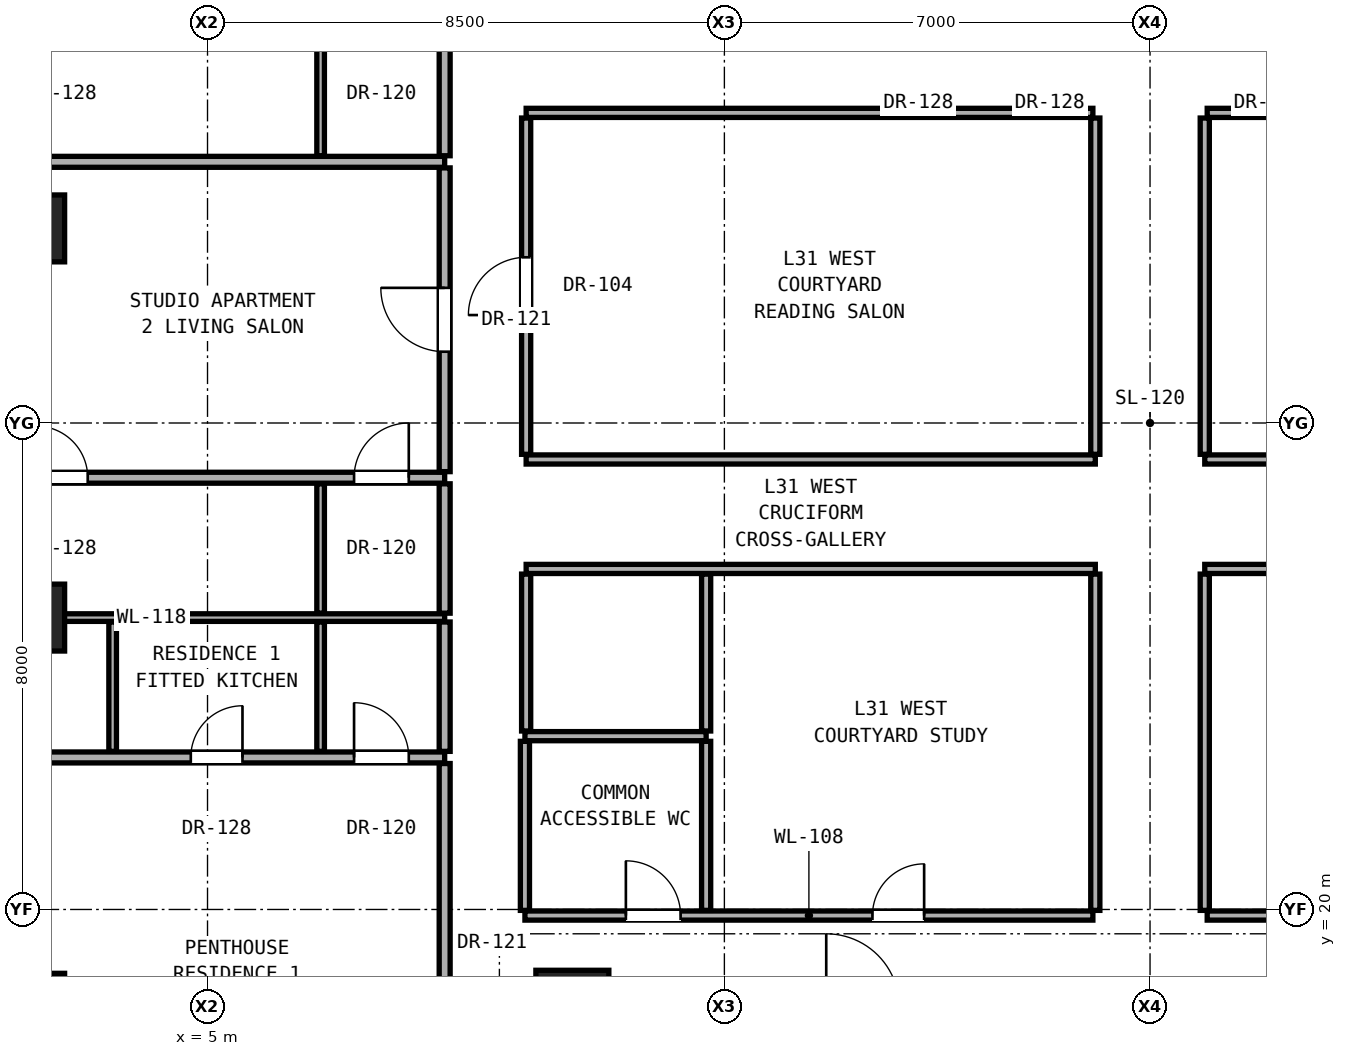
"""IFC4 building model, lengths in metres.
Left out: names, types, materials, properties, quantities, classifications, styles, units other than length and angle.
Written with IfcOpenShell. Run it as: python <this file> out.ifc"""

import sys

from ifc_helpers import new_model, si_unit, direction, frame, frame_2d, origin, origin_2d, place, context, subcontext, project, spatial, rectangle, hollow_rectangle, extrude, element, fill, save


model = new_model("IFC4")
c1 = context("Model", 3, precision=1e-05, world=origin(), true_north=direction((0.0, 1.0)))
c2 = subcontext(c1, "Body", "Model", "MODEL_VIEW")
j1 = project(units=[si_unit("LENGTHUNIT", "METRE"), si_unit("PLANEANGLEUNIT", "RADIAN")], contexts=[c1])
p1 = place(None, origin())
s1 = spatial("IfcSite", under=j1, at=p1, CompositionType="ELEMENT")
p2 = place(p1, origin())
s2 = spatial("IfcBuilding", under=s1, at=p2, CompositionType="ELEMENT")
p3 = place(p2, frame((0.0, 0.0, 111.5)))
s3 = spatial("IfcBuildingStorey", under=s2, at=p3, CompositionType="ELEMENT", Elevation=111.5)
p4 = place(p3, frame((11.0, 18.4, 0.0), z_axis=(0.0, 0.0, 1.0), x_axis=(1.0, 0.0, 0.0)))
e1 = element("IfcColumn", 1, at=p4, inside=s3, PredefinedType="COLUMN", context=c2, shape_type="SweptSolid", body=[
    extrude(rectangle(XDim=1.2, YDim=1.2, at=origin_2d()), origin(), (0.0, 0.0, 1.0), 3.3),
])
for number, where, z_axis, x_axis in (
    (2, (2.1, 18.4, 0.0), (0.0, 0.0, 1.0), (1.0, 0.0, 0.0)),
    (3, (2.1, 24.8, 0.0), (0.0, 0.0, 1.0), (1.0, 0.0, 0.0)),
    (4, (2.1, 31.2, 0.0), (0.0, 0.0, 1.0), (1.0, 0.0, 0.0)),
):
    element("IfcColumn", number, at=place(p3, frame(where, z_axis=z_axis, x_axis=x_axis)), inside=s3, PredefinedType="COLUMN", context=c2, shape_type="SweptSolid", body=[
        extrude(hollow_rectangle(XDim=1.1, YDim=1.1, WallThickness=0.06, at=origin_2d()), origin(), (0.0, 0.0, 1.0), 3.3),
    ])
p5 = place(p3, frame((10.22, 19.9, 0.0), z_axis=(0.0, 0.0, 1.0), x_axis=(1.0, 0.0, 0.0)))
e5 = element("IfcWall", 5, at=p5, inside=s3, PredefinedType="PARTITIONING", context=c2, shape_type="SweptSolid", body=[
    extrude(rectangle(XDim=9.34, YDim=0.15, at=frame_2d((4.67, 0.0))), origin(), (0.0, 0.0, 1.0), 2.124),
])
p6 = place(p5, frame((1.66, 0.0, 0.0)))
e6 = element("IfcOpeningElement", 6, at=p6, cuts=e5, PredefinedType="OPENING", context=c2, shape_type="SweptSolid", body=[
    extrude(rectangle(XDim=0.9, YDim=2.1, at=frame_2d((0.45, 1.05))), frame((0.0, 0.085, 0.0), z_axis=(0.0, -1.0, 0.0), x_axis=(1.0, 0.0, 0.0)), (0.0, 0.0, 1.0), 0.17),
])
p7 = place(p5, frame((5.715, 0.0, 0.0)))
e7 = element("IfcOpeningElement", 7, at=p7, cuts=e5, PredefinedType="OPENING", context=c2, shape_type="SweptSolid", body=[
    extrude(rectangle(XDim=0.85, YDim=2.01, at=frame_2d((0.425, 1.005))), frame((0.0, 0.085, 0.0), z_axis=(0.0, -1.0, 0.0), x_axis=(1.0, 0.0, 0.0)), (0.0, 0.0, 1.0), 0.17),
])
p8 = place(p3, frame((21.44, 19.9, 0.0), z_axis=(0.0, 0.0, 1.0), x_axis=(1.0, 0.0, 0.0)))
e8 = element("IfcWall", 8, at=p8, inside=s3, PredefinedType="PARTITIONING", context=c2, shape_type="SweptSolid", body=[
    extrude(rectangle(XDim=9.32, YDim=0.15, at=frame_2d((4.66, 0.0))), origin(), (0.0, 0.0, 1.0), 2.124),
])
p9 = place(p8, frame((4.235, 0.0, 0.0)))
e9 = element("IfcOpeningElement", 9, at=p9, cuts=e8, PredefinedType="OPENING", context=c2, shape_type="SweptSolid", body=[
    extrude(rectangle(XDim=0.85, YDim=2.01, at=frame_2d((0.425, 1.005))), frame((0.0, 0.085, 0.0), z_axis=(0.0, -1.0, 0.0), x_axis=(1.0, 0.0, 0.0)), (0.0, 0.0, 1.0), 0.17),
])
p10 = place(p3, frame((-1.69, 22.5, 0.0), z_axis=(0.0, 0.0, 1.0), x_axis=(1.0, 0.0, 0.0)))
e10 = element("IfcWall", 10, at=p10, inside=s3, PredefinedType="PARTITIONING", context=c2, shape_type="SweptSolid", body=[
    extrude(rectangle(XDim=10.59, YDim=0.18, at=frame_2d((5.295, 0.0))), origin(), (0.0, 0.0, 1.0), 2.145),
])
p11 = place(p10, frame((2.16, 0.0, 0.0)))
e11 = element("IfcOpeningElement", 11, at=p11, cuts=e10, PredefinedType="OPENING", context=c2, shape_type="SweptSolid", body=[
    extrude(rectangle(XDim=0.85, YDim=2.01, at=frame_2d((0.425, 1.005))), frame((0.0, 0.1, 0.0), z_axis=(0.0, -1.0, 0.0), x_axis=(1.0, 0.0, 0.0)), (0.0, 0.0, 1.0), 0.2),
])
p12 = place(p10, frame((6.415, 0.0, 0.0)))
e12 = element("IfcOpeningElement", 12, at=p12, cuts=e10, PredefinedType="OPENING", context=c2, shape_type="SweptSolid", body=[
    extrude(rectangle(XDim=0.85, YDim=2.01, at=frame_2d((0.425, 1.005))), frame((0.0, 0.1, 0.0), z_axis=(0.0, -1.0, 0.0), x_axis=(1.0, 0.0, 0.0)), (0.0, 0.0, 1.0), 0.2),
])
p13 = place(p10, frame((9.1, 0.0, 0.0)))
e13 = element("IfcOpeningElement", 13, at=p13, cuts=e10, PredefinedType="OPENING", context=c2, shape_type="SweptSolid", body=[
    extrude(rectangle(XDim=0.9, YDim=2.1, at=frame_2d((0.45, 1.05))), frame((0.0, 0.1, 0.0), z_axis=(0.0, -1.0, 0.0), x_axis=(1.0, 0.0, 0.0)), (0.0, 0.0, 1.0), 0.2),
])
p14 = place(p3, frame((10.22, 22.85, 0.0), z_axis=(0.0, 0.0, 1.0), x_axis=(1.0, 0.0, 0.0)))
e14 = element("IfcWall", 14, at=p14, inside=s3, PredefinedType="PARTITIONING", context=c2, shape_type="SweptSolid", body=[
    extrude(rectangle(XDim=2.98, YDim=0.15, at=frame_2d((1.49, 0.0))), origin(), (0.0, 0.0, 1.0), 2.124),
])
p15 = place(p3, frame((-1.69, 24.8, 0.0), z_axis=(0.0, 0.0, 1.0), x_axis=(1.0, 0.0, 0.0)))
e15 = element("IfcWall", 15, at=p15, inside=s3, PredefinedType="PARTITIONING", context=c2, shape_type="SweptSolid", body=[
    extrude(rectangle(XDim=10.59, YDim=0.125, at=frame_2d((5.295, 0.0))), origin(), (0.0, 0.0, 1.0), 2.145),
])
for number, where, z_axis, x_axis in (
    (16, (10.24, 25.6, 0.0), (0.0, 0.0, 1.0), (1.0, 0.0, 0.0)),
    (17, (21.4, 25.6, 0.0), (0.0, 0.0, 1.0), (1.0, 0.0, 0.0)),
):
    element("IfcWall", number, at=place(p3, frame(where, z_axis=z_axis, x_axis=x_axis)), inside=s3, PredefinedType="PARTITIONING", context=c2, shape_type="SweptSolid", body=[
        extrude(rectangle(XDim=9.36, YDim=0.15, at=frame_2d((4.68, 0.0))), origin(), (0.0, 0.0, 1.0), 2.124),
    ])
p16 = place(p3, frame((-1.69, 27.1, 0.0), z_axis=(0.0, 0.0, 1.0), x_axis=(1.0, 0.0, 0.0)))
e18 = element("IfcWall", 18, at=p16, inside=s3, PredefinedType="PARTITIONING", context=c2, shape_type="SweptSolid", body=[
    extrude(rectangle(XDim=10.59, YDim=0.18, at=frame_2d((5.295, 0.0))), origin(), (0.0, 0.0, 1.0), 2.145),
])
p17 = place(p16, frame((3.87, 0.0, 0.0)))
e19 = element("IfcOpeningElement", 19, at=p17, cuts=e18, PredefinedType="OPENING", context=c2, shape_type="SweptSolid", body=[
    extrude(rectangle(XDim=0.85, YDim=2.01, at=frame_2d((0.425, 1.005))), frame((0.0, 0.1, 0.0), z_axis=(0.0, -1.0, 0.0), x_axis=(1.0, 0.0, 0.0)), (0.0, 0.0, 1.0), 0.2),
])
p18 = place(p16, frame((9.1, 0.0, 0.0)))
e20 = element("IfcOpeningElement", 20, at=p18, cuts=e18, PredefinedType="OPENING", context=c2, shape_type="SweptSolid", body=[
    extrude(rectangle(XDim=0.9, YDim=2.1, at=frame_2d((0.45, 1.05))), frame((0.0, 0.1, 0.0), z_axis=(0.0, -1.0, 0.0), x_axis=(1.0, 0.0, 0.0)), (0.0, 0.0, 1.0), 0.2),
])
for number, where, z_axis, x_axis in (
    (21, (10.24, 27.4, 0.0), (0.0, 0.0, 1.0), (1.0, 0.0, 0.0)),
    (22, (21.4, 27.4, 0.0), (0.0, 0.0, 1.0), (1.0, 0.0, 0.0)),
):
    element("IfcWall", number, at=place(p3, frame(where, z_axis=z_axis, x_axis=x_axis)), inside=s3, PredefinedType="PARTITIONING", context=c2, shape_type="SweptSolid", body=[
        extrude(rectangle(XDim=9.36, YDim=0.15, at=frame_2d((4.68, 0.0))), origin(), (0.0, 0.0, 1.0), 2.124),
    ])
p19 = place(p3, frame((-1.69, 32.295, 0.0), z_axis=(0.0, 0.0, 1.0), x_axis=(1.0, 0.0, 0.0)))
e23 = element("IfcWall", 23, at=p19, inside=s3, PredefinedType="PARTITIONING", context=c2, shape_type="SweptSolid", body=[
    extrude(rectangle(XDim=10.59, YDim=0.18, at=frame_2d((5.295, 0.0))), origin(), (0.0, 0.0, 1.0), 2.145),
])
p20 = place(p3, frame((10.24, 33.1, 0.0), z_axis=(0.0, 0.0, 1.0), x_axis=(1.0, 0.0, 0.0)))
e24 = element("IfcWall", 24, at=p20, inside=s3, PredefinedType="PARTITIONING", context=c2, shape_type="SweptSolid", body=[
    extrude(rectangle(XDim=9.32, YDim=0.15, at=frame_2d((4.66, 0.0))), origin(), (0.0, 0.0, 1.0), 2.124),
])
p21 = place(p3, frame((21.44, 33.1, 0.0), z_axis=(0.0, 0.0, 1.0), x_axis=(1.0, 0.0, 0.0)))
e25 = element("IfcWall", 25, at=p21, inside=s3, PredefinedType="PARTITIONING", context=c2, shape_type="SweptSolid", body=[
    extrude(rectangle(XDim=9.32, YDim=0.15, at=frame_2d((4.66, 0.0))), origin(), (0.0, 0.0, 1.0), 2.124),
])
p22 = place(p21, frame((4.235, 0.0, 0.0)))
e26 = element("IfcOpeningElement", 26, at=p22, cuts=e25, PredefinedType="OPENING", context=c2, shape_type="SweptSolid", body=[
    extrude(rectangle(XDim=0.85, YDim=2.01, at=frame_2d((0.425, 1.005))), frame((0.0, 0.085, 0.0), z_axis=(0.0, -1.0, 0.0), x_axis=(1.0, 0.0, 0.0)), (0.0, 0.0, 1.0), 0.17),
])
for number, where, z_axis, x_axis in (
    (27, (3.44, 22.6, 0.0), (0.0, 0.0, 1.0), (0.0, 1.0, 0.0)),
    (28, (6.86, 22.6, 0.0), (0.0, 0.0, 1.0), (0.0, 1.0, 0.0)),
    (29, (6.86, 24.873, 0.0), (0.0, 0.0, 1.0), (0.0, 1.0, 0.0)),
):
    element("IfcWall", number, at=place(p3, frame(where, z_axis=z_axis, x_axis=x_axis)), inside=s3, PredefinedType="PARTITIONING", context=c2, shape_type="SweptSolid", body=[
        extrude(rectangle(XDim=2.127, YDim=0.125, at=frame_2d((1.064, 0.0))), origin(), (0.0, 0.0, 1.0), 2.299),
    ])
p23 = place(p3, frame((6.86, 32.395, 0.0), z_axis=(0.0, 0.0, 1.0), x_axis=(0.0, 1.0, 0.0)))
e30 = element("IfcWall", 30, at=p23, inside=s3, PredefinedType="PARTITIONING", context=c2, shape_type="SweptSolid", body=[
    extrude(rectangle(XDim=2.1, YDim=0.125, at=frame_2d((1.05, 0.0))), origin(), (0.0, 0.0, 1.0), 3.08),
])
p24 = place(p3, frame((8.9, 14.189, 0.0), z_axis=(0.0, 0.0, 1.0), x_axis=(0.0, 1.0, 0.0)))
e31 = element("IfcWall", 31, at=p24, inside=s3, PredefinedType="PARTITIONING", context=c2, shape_type="SweptSolid", body=[
    extrude(rectangle(XDim=8.211, YDim=0.18, at=frame_2d((4.105, 0.0))), origin(), (0.0, 0.0, 1.0), 2.456),
])
p25 = place(p24, frame((3.581, 0.0, 0.0)))
e32 = element("IfcOpeningElement", 32, at=p25, cuts=e31, PredefinedType="OPENING", context=c2, shape_type="SweptSolid", body=[
    extrude(rectangle(XDim=1.05, YDim=2.2, at=frame_2d((0.525, 1.1))), frame((0.0, 0.1, 0.0), z_axis=(0.0, -1.0, 0.0), x_axis=(1.0, 0.0, 0.0)), (0.0, 0.0, 1.0), 0.2),
])
for number, where, z_axis, x_axis in (
    (33, (8.9, 22.6, 0.0), (0.0, 0.0, 1.0), (0.0, 1.0, 0.0)),
    (34, (8.9, 24.873, 0.0), (0.0, 0.0, 1.0), (0.0, 1.0, 0.0)),
):
    element("IfcWall", number, at=place(p3, frame(where, z_axis=z_axis, x_axis=x_axis)), inside=s3, PredefinedType="PARTITIONING", context=c2, shape_type="SweptSolid", body=[
        extrude(rectangle(XDim=2.127, YDim=0.18, at=frame_2d((1.064, 0.0))), origin(), (0.0, 0.0, 1.0), 2.299),
    ])
p26 = place(p3, frame((8.9, 27.2, 0.0), z_axis=(0.0, 0.0, 1.0), x_axis=(0.0, 1.0, 0.0)))
e35 = element("IfcWall", 35, at=p26, inside=s3, PredefinedType="PARTITIONING", context=c2, shape_type="SweptSolid", body=[
    extrude(rectangle(XDim=4.995, YDim=0.18, at=frame_2d((2.498, 0.0))), origin(), (0.0, 0.0, 1.0), 2.299),
])
p27 = place(p26, frame((1.972, 0.0, 0.0)))
e36 = element("IfcOpeningElement", 36, at=p27, cuts=e35, PredefinedType="OPENING", context=c2, shape_type="SweptSolid", body=[
    extrude(rectangle(XDim=1.05, YDim=2.2, at=frame_2d((0.525, 1.1))), frame((0.0, 0.1, 0.0), z_axis=(0.0, -1.0, 0.0), x_axis=(1.0, 0.0, 0.0)), (0.0, 0.0, 1.0), 0.2),
])
p28 = place(p3, frame((8.9, 32.395, 0.0), z_axis=(0.0, 0.0, 1.0), x_axis=(0.0, 1.0, 0.0)))
e37 = element("IfcWall", 37, at=p28, inside=s3, PredefinedType="PARTITIONING", context=c2, shape_type="SweptSolid", body=[
    extrude(rectangle(XDim=2.1, YDim=0.18, at=frame_2d((1.05, 0.0))), origin(), (0.0, 0.0, 1.0), 3.08),
])
p29 = place(p3, frame((10.22, 19.985, 0.0), z_axis=(0.0, 0.0, 1.0), x_axis=(0.0, 1.0, 0.0)))
e38 = element("IfcWall", 38, at=p29, inside=s3, PredefinedType="PARTITIONING", context=c2, shape_type="SweptSolid", body=[
    extrude(rectangle(XDim=2.78, YDim=0.15, at=frame_2d((1.39, 0.0))), origin(), (0.0, 0.0, 1.0), 3.08),
])
p30 = place(p3, frame((10.24, 22.935, 0.0), z_axis=(0.0, 0.0, 1.0), x_axis=(0.0, 1.0, 0.0)))
e39 = element("IfcWall", 39, at=p30, inside=s3, PredefinedType="PARTITIONING", context=c2, shape_type="SweptSolid", body=[
    extrude(rectangle(XDim=2.58, YDim=0.15, at=frame_2d((1.29, 0.0))), origin(), (0.0, 0.0, 1.0), 2.299),
])
p31 = place(p3, frame((10.24, 27.485, 0.0), z_axis=(0.0, 0.0, 1.0), x_axis=(0.0, 1.0, 0.0)))
e40 = element("IfcWall", 40, at=p31, inside=s3, PredefinedType="PARTITIONING", context=c2, shape_type="SweptSolid", body=[
    extrude(rectangle(XDim=5.53, YDim=0.15, at=frame_2d((2.765, 0.0))), origin(), (0.0, 0.0, 1.0), 2.299),
])
p32 = place(p31, frame((2.29, 0.0, 0.0)))
e41 = element("IfcOpeningElement", 41, at=p32, cuts=e40, PredefinedType="OPENING", context=c2, shape_type="SweptSolid", body=[
    extrude(rectangle(XDim=0.95, YDim=2.15, at=frame_2d((0.475, 1.075))), frame((0.0, 0.085, 0.0), z_axis=(0.0, -1.0, 0.0), x_axis=(1.0, 0.0, 0.0)), (0.0, 0.0, 1.0), 0.17),
])
p33 = place(p3, frame((13.2, 19.985, 0.0), z_axis=(0.0, 0.0, 1.0), x_axis=(0.0, 1.0, 0.0)))
e42 = element("IfcWall", 42, at=p33, inside=s3, PredefinedType="PARTITIONING", context=c2, shape_type="SweptSolid", body=[
    extrude(rectangle(XDim=2.78, YDim=0.15, at=frame_2d((1.39, 0.0))), origin(), (0.0, 0.0, 1.0), 3.08),
])
p34 = place(p3, frame((13.2, 22.935, 0.0), z_axis=(0.0, 0.0, 1.0), x_axis=(0.0, 1.0, 0.0)))
e43 = element("IfcWall", 43, at=p34, inside=s3, PredefinedType="PARTITIONING", context=c2, shape_type="SweptSolid", body=[
    extrude(rectangle(XDim=2.58, YDim=0.15, at=frame_2d((1.29, 0.0))), origin(), (0.0, 0.0, 1.0), 2.124),
])
for number, where, z_axis, x_axis in (
    (44, (19.6, 19.985, 0.0), (0.0, 0.0, 1.0), (0.0, 1.0, 0.0)),
    (45, (19.6, 27.485, 0.0), (0.0, 0.0, 1.0), (0.0, 1.0, 0.0)),
    (46, (21.4, 19.985, 0.0), (0.0, 0.0, 1.0), (0.0, 1.0, 0.0)),
    (47, (21.4, 27.485, 0.0), (0.0, 0.0, 1.0), (0.0, 1.0, 0.0)),
):
    element("IfcWall", number, at=place(p3, frame(where, z_axis=z_axis, x_axis=x_axis)), inside=s3, PredefinedType="PARTITIONING", context=c2, shape_type="SweptSolid", body=[
        extrude(rectangle(XDim=5.53, YDim=0.15, at=frame_2d((2.765, 0.0))), origin(), (0.0, 0.0, 1.0), 2.124),
    ])
p35 = place(p6, origin())
e48 = element("IfcDoor", 48, at=p35, inside=s3, OperationType="SINGLE_SWING_LEFT", PredefinedType="DOOR", context=c2, shape_type="SweptSolid", body=[
    extrude(rectangle(XDim=0.9, YDim=2.1, at=frame_2d((0.45, 1.05))), frame((0.0, 0.025, 0.0), z_axis=(0.0, -1.0, 0.0), x_axis=(1.0, 0.0, 0.0)), (0.0, 0.0, 1.0), 0.05),
])
fill(e6, e48)
p36 = place(p12, origin())
e49 = element("IfcDoor", 49, at=p36, inside=s3, OperationType="SINGLE_SWING_RIGHT", PredefinedType="DOOR", context=c2, shape_type="SweptSolid", body=[
    extrude(rectangle(XDim=0.85, YDim=2.01, at=frame_2d((0.425, 1.005))), frame((0.0, 0.025, 0.0), z_axis=(0.0, -1.0, 0.0), x_axis=(1.0, 0.0, 0.0)), (0.0, 0.0, 1.0), 0.05),
])
fill(e12, e49)
p37 = place(p13, origin())
e50 = element("IfcDoor", 50, at=p37, inside=s3, OperationType="SINGLE_SWING_LEFT", PredefinedType="DOOR", context=c2, shape_type="SweptSolid", body=[
    extrude(rectangle(XDim=0.9, YDim=2.1, at=frame_2d((0.45, 1.05))), frame((0.0, 0.025, 0.0), z_axis=(0.0, -1.0, 0.0), x_axis=(1.0, 0.0, 0.0)), (0.0, 0.0, 1.0), 0.05),
])
fill(e13, e50)
p38 = place(p27, origin())
e51 = element("IfcDoor", 51, at=p38, inside=s3, OperationType="SINGLE_SWING_RIGHT", PredefinedType="DOOR", context=c2, shape_type="SweptSolid", body=[
    extrude(rectangle(XDim=1.05, YDim=2.2, at=frame_2d((0.525, 1.1))), frame((0.0, 0.025, 0.0), z_axis=(0.0, -1.0, 0.0), x_axis=(1.0, 0.0, 0.0)), (0.0, 0.0, 1.0), 0.05),
])
fill(e36, e51)
p39 = place(p17, origin())
e52 = element("IfcDoor", 52, at=p39, inside=s3, OperationType="SINGLE_SWING_LEFT", PredefinedType="DOOR", context=c2, shape_type="SweptSolid", body=[
    extrude(rectangle(XDim=0.85, YDim=2.01, at=frame_2d((0.425, 1.005))), frame((0.0, 0.025, 0.0), z_axis=(0.0, -1.0, 0.0), x_axis=(1.0, 0.0, 0.0)), (0.0, 0.0, 1.0), 0.05),
])
fill(e19, e52)
p40 = place(p18, origin())
e53 = element("IfcDoor", 53, at=p40, inside=s3, OperationType="SINGLE_SWING_RIGHT", PredefinedType="DOOR", context=c2, shape_type="SweptSolid", body=[
    extrude(rectangle(XDim=0.9, YDim=2.1, at=frame_2d((0.45, 1.05))), frame((0.0, 0.025, 0.0), z_axis=(0.0, -1.0, 0.0), x_axis=(1.0, 0.0, 0.0)), (0.0, 0.0, 1.0), 0.05),
])
fill(e20, e53)
p41 = place(p7, origin())
e54 = element("IfcDoor", 54, at=p41, inside=s3, OperationType="SINGLE_SWING_RIGHT", PredefinedType="DOOR", context=c2, shape_type="SweptSolid", body=[
    extrude(rectangle(XDim=0.85, YDim=2.01, at=frame_2d((0.425, 1.005))), frame((0.0, 0.025, 0.0), z_axis=(0.0, -1.0, 0.0), x_axis=(1.0, 0.0, 0.0)), (0.0, 0.0, 1.0), 0.05),
])
fill(e7, e54)
p42 = place(p32, origin())
e55 = element("IfcDoor", 55, at=p42, inside=s3, OperationType="SINGLE_SWING_LEFT", PredefinedType="DOOR", context=c2, shape_type="SweptSolid", body=[
    extrude(rectangle(XDim=0.95, YDim=2.15, at=frame_2d((0.475, 1.075))), frame((0.0, 0.025, 0.0), z_axis=(0.0, -1.0, 0.0), x_axis=(1.0, 0.0, 0.0)), (0.0, 0.0, 1.0), 0.05),
])
fill(e41, e55)
save(model, sys.argv[1])
